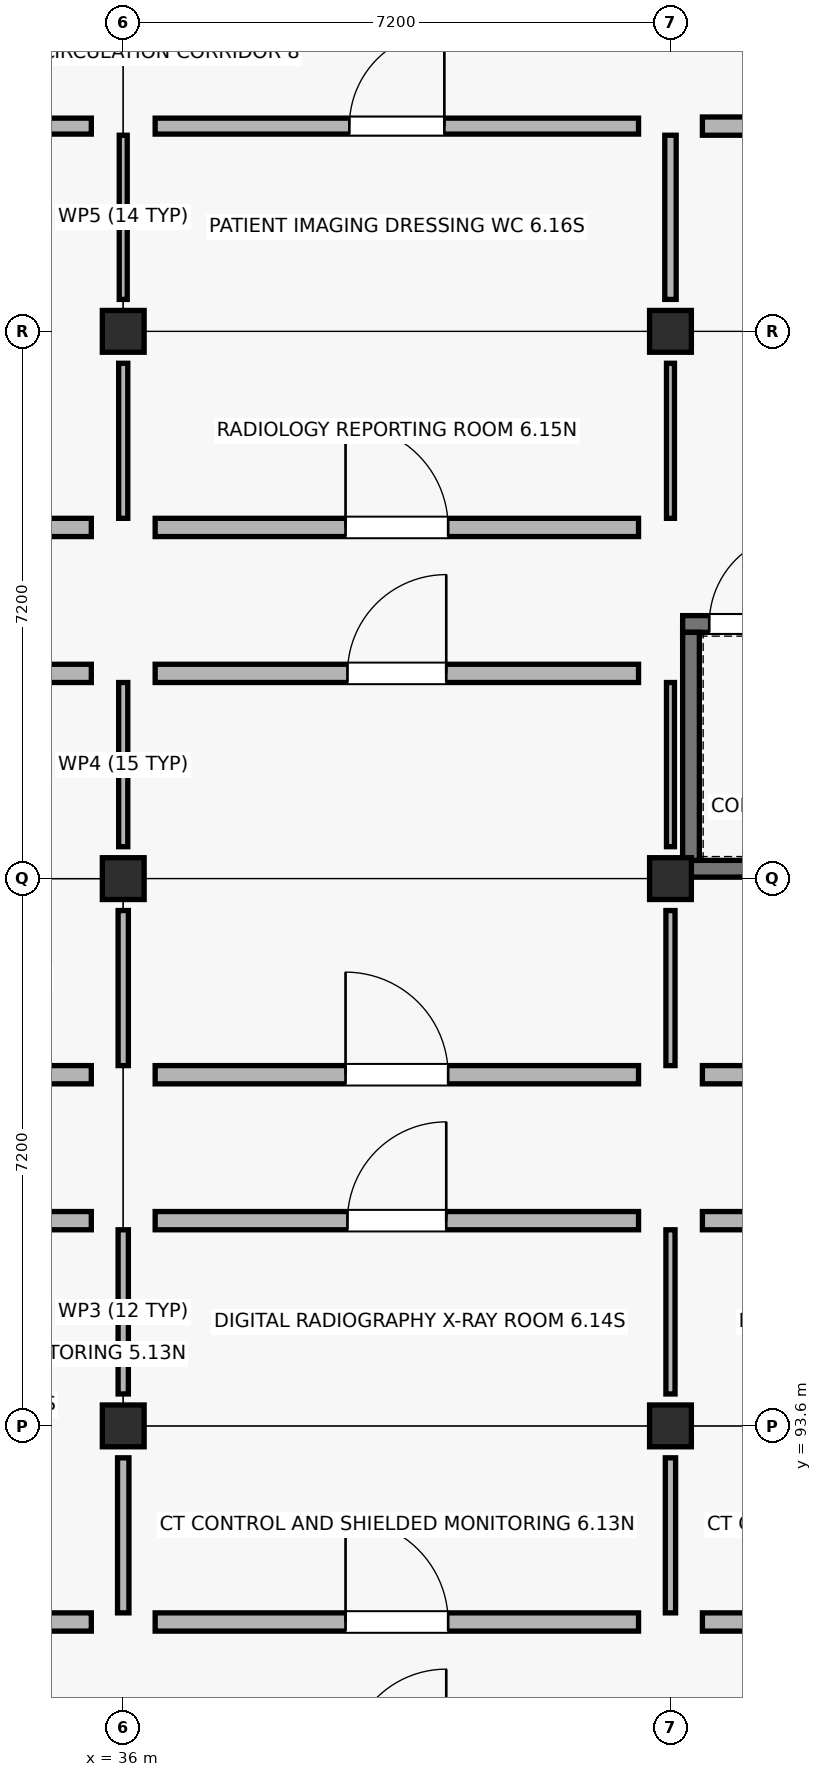
"""IFC4 building model, lengths in metres.
Left out: names, types, materials, properties, quantities, classifications, styles, units other than length and angle.
Written with IfcOpenShell. Run it as: python <this file> out.ifc"""

import sys

from ifc_helpers import new_model, si_unit, direction, frame, frame_2d, origin, origin_2d, place, context, subcontext, project, spatial, rectangle, extrude, element, fill, save


model = new_model("IFC4")
c1 = context("Model", 3, precision=1e-05, world=origin(), true_north=direction((0.0, 1.0)))
c2 = subcontext(c1, "Body", "Model", "MODEL_VIEW")
j1 = project(units=[si_unit("LENGTHUNIT", "METRE"), si_unit("PLANEANGLEUNIT", "RADIAN")], contexts=[c1])
p1 = place(None, origin())
s1 = spatial("IfcSite", under=j1, at=p1, CompositionType="ELEMENT")
p2 = place(p1, origin())
s2 = spatial("IfcBuilding", under=s1, at=p2, CompositionType="ELEMENT")
p3 = place(p2, frame((0.0, 0.0, 4.5)))
s3 = spatial("IfcBuildingStorey", under=s2, at=p3, CompositionType="ELEMENT", Elevation=4.5)
for number, where, z_axis, x_axis in (
    (1, (36.0, 93.6, 0.0), (0.0, 0.0, 1.0), (1.0, 0.0, 0.0)),
    (2, (36.0, 100.8, 0.0), (0.0, 0.0, 1.0), (1.0, 0.0, 0.0)),
    (3, (36.0, 108.0, 0.0), (0.0, 0.0, 1.0), (1.0, 0.0, 0.0)),
    (4, (43.2, 93.6, 0.0), (0.0, 0.0, 1.0), (1.0, 0.0, 0.0)),
    (5, (43.2, 100.8, 0.0), (0.0, 0.0, 1.0), (1.0, 0.0, 0.0)),
    (6, (43.2, 108.0, 0.0), (0.0, 0.0, 1.0), (1.0, 0.0, 0.0)),
):
    element("IfcColumn", number, at=place(p3, frame(where, z_axis=z_axis, x_axis=x_axis)), inside=s3, PredefinedType="COLUMN", context=c2, shape_type="SweptSolid", body=[
        extrude(rectangle(XDim=0.55, YDim=0.55, at=origin_2d()), origin(), (0.0, 0.0, 1.0), 4.5),
    ])
p4 = place(p3, frame((43.36, 100.93, 0.0), z_axis=(0.0, 0.0, 1.0), x_axis=(1.0, 0.0, 0.0)))
e7 = element("IfcWall", 7, at=p4, inside=s3, PredefinedType="SHEAR", context=c2, shape_type="SweptSolid", body=[
    extrude(rectangle(XDim=6.88, YDim=0.22, at=frame_2d((3.44, 0.0))), origin(), (0.0, 0.0, 1.0), 4.22),
])
p5 = place(p3, frame((43.36, 104.15, 0.0), z_axis=(0.0, 0.0, 1.0), x_axis=(1.0, 0.0, 0.0)))
e8 = element("IfcWall", 8, at=p5, inside=s3, PredefinedType="SHEAR", context=c2, shape_type="SweptSolid", body=[
    extrude(rectangle(XDim=6.88, YDim=0.22, at=frame_2d((3.44, 0.0))), origin(), (0.0, 0.0, 1.0), 4.22),
])
p6 = place(p5, frame((0.35, 0.0, 0.0)))
e9 = element("IfcOpeningElement", 9, at=p6, cuts=e8, PredefinedType="OPENING", context=c2, shape_type="SweptSolid", body=[
    extrude(rectangle(XDim=1.2, YDim=2.15, at=frame_2d((0.6, 1.075))), frame((0.0, 0.12, 0.0), z_axis=(0.0, -1.0, 0.0), x_axis=(1.0, 0.0, 0.0)), (0.0, 0.0, 1.0), 0.24),
])
p7 = place(p3, frame((43.47, 101.04, 0.0), z_axis=(0.0, 0.0, 1.0), x_axis=(0.0, 1.0, 0.0)))
e10 = element("IfcWall", 10, at=p7, inside=s3, PredefinedType="SHEAR", context=c2, shape_type="SweptSolid", body=[
    extrude(rectangle(XDim=3.0, YDim=0.22, at=frame_2d((1.5, 0.0))), origin(), (0.0, 0.0, 1.0), 4.22),
])
p8 = place(p3, frame((29.22, 91.02, 0.0), z_axis=(0.0, 0.0, 1.0), x_axis=(1.0, 0.0, 0.0)))
e11 = element("IfcWall", 11, at=p8, inside=s3, PredefinedType="SOLIDWALL", context=c2, shape_type="SweptSolid", body=[
    extrude(rectangle(XDim=6.36, YDim=0.24, at=frame_2d((3.18, 0.0))), origin(), (0.0, 0.0, 1.0), 3.36),
])
p9 = place(p8, frame((2.505, 0.0, 0.0)))
e12 = element("IfcOpeningElement", 12, at=p9, cuts=e11, PredefinedType="OPENING", context=c2, shape_type="SweptSolid", body=[
    extrude(rectangle(XDim=1.35, YDim=2.2, at=frame_2d((0.675, 1.1))), frame((0.0, 0.13, 0.0), z_axis=(0.0, -1.0, 0.0), x_axis=(1.0, 0.0, 0.0)), (0.0, 0.0, 1.0), 0.26),
])
p10 = place(p3, frame((36.0, 91.14, 0.0), z_axis=(0.0, 0.0, 1.0), x_axis=(0.0, 1.0, 0.0)))
e13 = element("IfcWall", 13, at=p10, inside=s3, PredefinedType="PARTITIONING", context=c2, shape_type="SweptSolid", body=[
    extrude(rectangle(XDim=2.04, YDim=0.15, at=frame_2d((1.02, 0.0))), origin(), (0.0, 0.0, 1.0), 3.36),
])
p11 = place(p3, frame((29.22, 96.3, 0.0), z_axis=(0.0, 0.0, 1.0), x_axis=(1.0, 0.0, 0.0)))
e14 = element("IfcWall", 14, at=p11, inside=s3, PredefinedType="SOLIDWALL", context=c2, shape_type="SweptSolid", body=[
    extrude(rectangle(XDim=6.36, YDim=0.24, at=frame_2d((3.18, 0.0))), origin(), (0.0, 0.0, 1.0), 3.36),
])
p12 = place(p11, frame((2.53, 0.0, 0.0)))
e15 = element("IfcOpeningElement", 15, at=p12, cuts=e14, PredefinedType="OPENING", context=c2, shape_type="SweptSolid", body=[
    extrude(rectangle(XDim=1.3, YDim=2.15, at=frame_2d((0.65, 1.075))), frame((0.0, 0.13, 0.0), z_axis=(0.0, -1.0, 0.0), x_axis=(1.0, 0.0, 0.0)), (0.0, 0.0, 1.0), 0.26),
])
p13 = place(p3, frame((36.0, 94.02, 0.0), z_axis=(0.0, 0.0, 1.0), x_axis=(0.0, 1.0, 0.0)))
e16 = element("IfcWall", 16, at=p13, inside=s3, PredefinedType="PARTITIONING", context=c2, shape_type="SweptSolid", body=[
    extrude(rectangle(XDim=2.16, YDim=0.135, at=frame_2d((1.08, 0.0))), origin(), (0.0, 0.0, 1.0), 3.36),
])
p14 = place(p3, frame((29.22, 98.22, 0.0), z_axis=(0.0, 0.0, 1.0), x_axis=(1.0, 0.0, 0.0)))
e17 = element("IfcWall", 17, at=p14, inside=s3, PredefinedType="SOLIDWALL", context=c2, shape_type="SweptSolid", body=[
    extrude(rectangle(XDim=6.36, YDim=0.24, at=frame_2d((3.18, 0.0))), origin(), (0.0, 0.0, 1.0), 3.36),
])
p15 = place(p14, frame((2.505, 0.0, 0.0)))
e18 = element("IfcOpeningElement", 18, at=p15, cuts=e17, PredefinedType="OPENING", context=c2, shape_type="SweptSolid", body=[
    extrude(rectangle(XDim=1.35, YDim=2.2, at=frame_2d((0.675, 1.1))), frame((0.0, 0.13, 0.0), z_axis=(0.0, -1.0, 0.0), x_axis=(1.0, 0.0, 0.0)), (0.0, 0.0, 1.0), 0.26),
])
p16 = place(p3, frame((36.0, 98.34, 0.0), z_axis=(0.0, 0.0, 1.0), x_axis=(0.0, 1.0, 0.0)))
e19 = element("IfcWall", 19, at=p16, inside=s3, PredefinedType="PARTITIONING", context=c2, shape_type="SweptSolid", body=[
    extrude(rectangle(XDim=2.04, YDim=0.135, at=frame_2d((1.02, 0.0))), origin(), (0.0, 0.0, 1.0), 3.36),
])
p17 = place(p3, frame((29.22, 103.5, 0.0), z_axis=(0.0, 0.0, 1.0), x_axis=(1.0, 0.0, 0.0)))
e20 = element("IfcWall", 20, at=p17, inside=s3, PredefinedType="SOLIDWALL", context=c2, shape_type="SweptSolid", body=[
    extrude(rectangle(XDim=6.36, YDim=0.24, at=frame_2d((3.18, 0.0))), origin(), (0.0, 0.0, 1.0), 3.36),
])
p18 = place(p17, frame((2.53, 0.0, 0.0)))
e21 = element("IfcOpeningElement", 21, at=p18, cuts=e20, PredefinedType="OPENING", context=c2, shape_type="SweptSolid", body=[
    extrude(rectangle(XDim=1.3, YDim=2.15, at=frame_2d((0.65, 1.075))), frame((0.0, 0.13, 0.0), z_axis=(0.0, -1.0, 0.0), x_axis=(1.0, 0.0, 0.0)), (0.0, 0.0, 1.0), 0.26),
])
p19 = place(p3, frame((36.0, 101.22, 0.0), z_axis=(0.0, 0.0, 1.0), x_axis=(0.0, 1.0, 0.0)))
e22 = element("IfcWall", 22, at=p19, inside=s3, PredefinedType="PARTITIONING", context=c2, shape_type="SweptSolid", body=[
    extrude(rectangle(XDim=2.16, YDim=0.12, at=frame_2d((1.08, 0.0))), origin(), (0.0, 0.0, 1.0), 3.36),
])
p20 = place(p3, frame((29.22, 105.42, 0.0), z_axis=(0.0, 0.0, 1.0), x_axis=(1.0, 0.0, 0.0)))
e23 = element("IfcWall", 23, at=p20, inside=s3, PredefinedType="SOLIDWALL", context=c2, shape_type="SweptSolid", body=[
    extrude(rectangle(XDim=6.36, YDim=0.24, at=frame_2d((3.18, 0.0))), origin(), (0.0, 0.0, 1.0), 3.36),
])
p21 = place(p20, frame((2.505, 0.0, 0.0)))
e24 = element("IfcOpeningElement", 24, at=p21, cuts=e23, PredefinedType="OPENING", context=c2, shape_type="SweptSolid", body=[
    extrude(rectangle(XDim=1.35, YDim=2.2, at=frame_2d((0.675, 1.1))), frame((0.0, 0.13, 0.0), z_axis=(0.0, -1.0, 0.0), x_axis=(1.0, 0.0, 0.0)), (0.0, 0.0, 1.0), 0.26),
])
p22 = place(p3, frame((36.0, 105.54, 0.0), z_axis=(0.0, 0.0, 1.0), x_axis=(0.0, 1.0, 0.0)))
e25 = element("IfcWall", 25, at=p22, inside=s3, PredefinedType="PARTITIONING", context=c2, shape_type="SweptSolid", body=[
    extrude(rectangle(XDim=2.04, YDim=0.12, at=frame_2d((1.02, 0.0))), origin(), (0.0, 0.0, 1.0), 3.36),
])
p23 = place(p3, frame((29.22, 110.7, 0.0), z_axis=(0.0, 0.0, 1.0), x_axis=(1.0, 0.0, 0.0)))
e26 = element("IfcWall", 26, at=p23, inside=s3, PredefinedType="PLUMBINGWALL", context=c2, shape_type="SweptSolid", body=[
    extrude(rectangle(XDim=6.36, YDim=0.21, at=frame_2d((3.18, 0.0))), origin(), (0.0, 0.0, 1.0), 3.36),
])
p24 = place(p23, frame((2.57, 0.0, 0.0)))
e27 = element("IfcOpeningElement", 27, at=p24, cuts=e26, PredefinedType="OPENING", context=c2, shape_type="SweptSolid", body=[
    extrude(rectangle(XDim=1.22, YDim=2.19, at=frame_2d((0.61, 1.095))), frame((0.0, 0.115, 0.0), z_axis=(0.0, -1.0, 0.0), x_axis=(1.0, 0.0, 0.0)), (0.0, 0.0, 1.0), 0.23),
])
p25 = place(p3, frame((36.0, 108.42, 0.0), z_axis=(0.0, 0.0, 1.0), x_axis=(0.0, 1.0, 0.0)))
e28 = element("IfcWall", 28, at=p25, inside=s3, PredefinedType="PARTITIONING", context=c2, shape_type="SweptSolid", body=[
    extrude(rectangle(XDim=2.16, YDim=0.105, at=frame_2d((1.08, 0.0))), origin(), (0.0, 0.0, 1.0), 3.36),
])
p26 = place(p3, frame((36.42, 91.02, 0.0), z_axis=(0.0, 0.0, 1.0), x_axis=(1.0, 0.0, 0.0)))
e29 = element("IfcWall", 29, at=p26, inside=s3, PredefinedType="SOLIDWALL", context=c2, shape_type="SweptSolid", body=[
    extrude(rectangle(XDim=6.36, YDim=0.24, at=frame_2d((3.18, 0.0))), origin(), (0.0, 0.0, 1.0), 3.36),
])
p27 = place(p26, frame((2.505, 0.0, 0.0)))
e30 = element("IfcOpeningElement", 30, at=p27, cuts=e29, PredefinedType="OPENING", context=c2, shape_type="SweptSolid", body=[
    extrude(rectangle(XDim=1.35, YDim=2.2, at=frame_2d((0.675, 1.1))), frame((0.0, 0.13, 0.0), z_axis=(0.0, -1.0, 0.0), x_axis=(1.0, 0.0, 0.0)), (0.0, 0.0, 1.0), 0.26),
])
p28 = place(p3, frame((43.2, 91.14, 0.0), z_axis=(0.0, 0.0, 1.0), x_axis=(0.0, 1.0, 0.0)))
e31 = element("IfcWall", 31, at=p28, inside=s3, PredefinedType="PARTITIONING", context=c2, shape_type="SweptSolid", body=[
    extrude(rectangle(XDim=2.04, YDim=0.135, at=frame_2d((1.02, 0.0))), origin(), (0.0, 0.0, 1.0), 3.36),
])
p29 = place(p3, frame((36.42, 96.3, 0.0), z_axis=(0.0, 0.0, 1.0), x_axis=(1.0, 0.0, 0.0)))
e32 = element("IfcWall", 32, at=p29, inside=s3, PredefinedType="SOLIDWALL", context=c2, shape_type="SweptSolid", body=[
    extrude(rectangle(XDim=6.36, YDim=0.24, at=frame_2d((3.18, 0.0))), origin(), (0.0, 0.0, 1.0), 3.36),
])
p30 = place(p29, frame((2.53, 0.0, 0.0)))
e33 = element("IfcOpeningElement", 33, at=p30, cuts=e32, PredefinedType="OPENING", context=c2, shape_type="SweptSolid", body=[
    extrude(rectangle(XDim=1.3, YDim=2.15, at=frame_2d((0.65, 1.075))), frame((0.0, 0.13, 0.0), z_axis=(0.0, -1.0, 0.0), x_axis=(1.0, 0.0, 0.0)), (0.0, 0.0, 1.0), 0.26),
])
p31 = place(p3, frame((43.2, 94.02, 0.0), z_axis=(0.0, 0.0, 1.0), x_axis=(0.0, 1.0, 0.0)))
e34 = element("IfcWall", 34, at=p31, inside=s3, PredefinedType="PARTITIONING", context=c2, shape_type="SweptSolid", body=[
    extrude(rectangle(XDim=2.16, YDim=0.12, at=frame_2d((1.08, 0.0))), origin(), (0.0, 0.0, 1.0), 3.36),
])
p32 = place(p3, frame((36.42, 98.22, 0.0), z_axis=(0.0, 0.0, 1.0), x_axis=(1.0, 0.0, 0.0)))
e35 = element("IfcWall", 35, at=p32, inside=s3, PredefinedType="SOLIDWALL", context=c2, shape_type="SweptSolid", body=[
    extrude(rectangle(XDim=6.36, YDim=0.24, at=frame_2d((3.18, 0.0))), origin(), (0.0, 0.0, 1.0), 3.36),
])
p33 = place(p32, frame((2.505, 0.0, 0.0)))
e36 = element("IfcOpeningElement", 36, at=p33, cuts=e35, PredefinedType="OPENING", context=c2, shape_type="SweptSolid", body=[
    extrude(rectangle(XDim=1.35, YDim=2.2, at=frame_2d((0.675, 1.1))), frame((0.0, 0.13, 0.0), z_axis=(0.0, -1.0, 0.0), x_axis=(1.0, 0.0, 0.0)), (0.0, 0.0, 1.0), 0.26),
])
p34 = place(p3, frame((43.2, 98.34, 0.0), z_axis=(0.0, 0.0, 1.0), x_axis=(0.0, 1.0, 0.0)))
e37 = element("IfcWall", 37, at=p34, inside=s3, PredefinedType="PARTITIONING", context=c2, shape_type="SweptSolid", body=[
    extrude(rectangle(XDim=2.04, YDim=0.12, at=frame_2d((1.02, 0.0))), origin(), (0.0, 0.0, 1.0), 3.36),
])
p35 = place(p3, frame((36.42, 103.5, 0.0), z_axis=(0.0, 0.0, 1.0), x_axis=(1.0, 0.0, 0.0)))
e38 = element("IfcWall", 38, at=p35, inside=s3, PredefinedType="SOLIDWALL", context=c2, shape_type="SweptSolid", body=[
    extrude(rectangle(XDim=6.36, YDim=0.24, at=frame_2d((3.18, 0.0))), origin(), (0.0, 0.0, 1.0), 3.36),
])
p36 = place(p35, frame((2.53, 0.0, 0.0)))
e39 = element("IfcOpeningElement", 39, at=p36, cuts=e38, PredefinedType="OPENING", context=c2, shape_type="SweptSolid", body=[
    extrude(rectangle(XDim=1.3, YDim=2.15, at=frame_2d((0.65, 1.075))), frame((0.0, 0.13, 0.0), z_axis=(0.0, -1.0, 0.0), x_axis=(1.0, 0.0, 0.0)), (0.0, 0.0, 1.0), 0.26),
])
p37 = place(p3, frame((43.2, 101.22, 0.0), z_axis=(0.0, 0.0, 1.0), x_axis=(0.0, 1.0, 0.0)))
e40 = element("IfcWall", 40, at=p37, inside=s3, PredefinedType="PARTITIONING", context=c2, shape_type="SweptSolid", body=[
    extrude(rectangle(XDim=2.16, YDim=0.105, at=frame_2d((1.08, 0.0))), origin(), (0.0, 0.0, 1.0), 3.36),
])
p38 = place(p3, frame((36.42, 105.42, 0.0), z_axis=(0.0, 0.0, 1.0), x_axis=(1.0, 0.0, 0.0)))
e41 = element("IfcWall", 41, at=p38, inside=s3, PredefinedType="SOLIDWALL", context=c2, shape_type="SweptSolid", body=[
    extrude(rectangle(XDim=6.36, YDim=0.24, at=frame_2d((3.18, 0.0))), origin(), (0.0, 0.0, 1.0), 3.36),
])
p39 = place(p38, frame((2.505, 0.0, 0.0)))
e42 = element("IfcOpeningElement", 42, at=p39, cuts=e41, PredefinedType="OPENING", context=c2, shape_type="SweptSolid", body=[
    extrude(rectangle(XDim=1.35, YDim=2.2, at=frame_2d((0.675, 1.1))), frame((0.0, 0.13, 0.0), z_axis=(0.0, -1.0, 0.0), x_axis=(1.0, 0.0, 0.0)), (0.0, 0.0, 1.0), 0.26),
])
p40 = place(p3, frame((43.2, 105.54, 0.0), z_axis=(0.0, 0.0, 1.0), x_axis=(0.0, 1.0, 0.0)))
e43 = element("IfcWall", 43, at=p40, inside=s3, PredefinedType="PARTITIONING", context=c2, shape_type="SweptSolid", body=[
    extrude(rectangle(XDim=2.04, YDim=0.105, at=frame_2d((1.02, 0.0))), origin(), (0.0, 0.0, 1.0), 3.36),
])
p41 = place(p3, frame((36.42, 110.7, 0.0), z_axis=(0.0, 0.0, 1.0), x_axis=(1.0, 0.0, 0.0)))
e44 = element("IfcWall", 44, at=p41, inside=s3, PredefinedType="PLUMBINGWALL", context=c2, shape_type="SweptSolid", body=[
    extrude(rectangle(XDim=6.36, YDim=0.21, at=frame_2d((3.18, 0.0))), origin(), (0.0, 0.0, 1.0), 3.36),
])
p42 = place(p41, frame((2.555, 0.0, 0.0)))
e45 = element("IfcOpeningElement", 45, at=p42, cuts=e44, PredefinedType="OPENING", context=c2, shape_type="SweptSolid", body=[
    extrude(rectangle(XDim=1.25, YDim=2.15, at=frame_2d((0.625, 1.075))), frame((0.0, 0.115, 0.0), z_axis=(0.0, -1.0, 0.0), x_axis=(1.0, 0.0, 0.0)), (0.0, 0.0, 1.0), 0.23),
])
p43 = place(p3, frame((43.2, 108.42, 0.0), z_axis=(0.0, 0.0, 1.0), x_axis=(0.0, 1.0, 0.0)))
e46 = element("IfcWall", 46, at=p43, inside=s3, PredefinedType="PARTITIONING", context=c2, shape_type="SweptSolid", body=[
    extrude(rectangle(XDim=2.16, YDim=0.15, at=frame_2d((1.08, 0.0))), origin(), (0.0, 0.0, 1.0), 3.36),
])
p44 = place(p3, frame((43.62, 91.02, 0.0), z_axis=(0.0, 0.0, 1.0), x_axis=(1.0, 0.0, 0.0)))
e47 = element("IfcWall", 47, at=p44, inside=s3, PredefinedType="SOLIDWALL", context=c2, shape_type="SweptSolid", body=[
    extrude(rectangle(XDim=6.36, YDim=0.24, at=frame_2d((3.18, 0.0))), origin(), (0.0, 0.0, 1.0), 3.36),
])
p45 = place(p44, frame((2.505, 0.0, 0.0)))
e48 = element("IfcOpeningElement", 48, at=p45, cuts=e47, PredefinedType="OPENING", context=c2, shape_type="SweptSolid", body=[
    extrude(rectangle(XDim=1.35, YDim=2.2, at=frame_2d((0.675, 1.1))), frame((0.0, 0.13, 0.0), z_axis=(0.0, -1.0, 0.0), x_axis=(1.0, 0.0, 0.0)), (0.0, 0.0, 1.0), 0.26),
])
p46 = place(p3, frame((43.62, 96.3, 0.0), z_axis=(0.0, 0.0, 1.0), x_axis=(1.0, 0.0, 0.0)))
e49 = element("IfcWall", 49, at=p46, inside=s3, PredefinedType="SOLIDWALL", context=c2, shape_type="SweptSolid", body=[
    extrude(rectangle(XDim=6.36, YDim=0.24, at=frame_2d((3.18, 0.0))), origin(), (0.0, 0.0, 1.0), 3.36),
])
p47 = place(p46, frame((2.53, 0.0, 0.0)))
e50 = element("IfcOpeningElement", 50, at=p47, cuts=e49, PredefinedType="OPENING", context=c2, shape_type="SweptSolid", body=[
    extrude(rectangle(XDim=1.3, YDim=2.15, at=frame_2d((0.65, 1.075))), frame((0.0, 0.13, 0.0), z_axis=(0.0, -1.0, 0.0), x_axis=(1.0, 0.0, 0.0)), (0.0, 0.0, 1.0), 0.26),
])
p48 = place(p3, frame((43.62, 98.22, 0.0), z_axis=(0.0, 0.0, 1.0), x_axis=(1.0, 0.0, 0.0)))
e51 = element("IfcWall", 51, at=p48, inside=s3, PredefinedType="SOLIDWALL", context=c2, shape_type="SweptSolid", body=[
    extrude(rectangle(XDim=6.36, YDim=0.24, at=frame_2d((3.18, 0.0))), origin(), (0.0, 0.0, 1.0), 3.36),
])
p49 = place(p48, frame((2.505, 0.0, 0.0)))
e52 = element("IfcOpeningElement", 52, at=p49, cuts=e51, PredefinedType="OPENING", context=c2, shape_type="SweptSolid", body=[
    extrude(rectangle(XDim=1.35, YDim=2.2, at=frame_2d((0.675, 1.1))), frame((0.0, 0.13, 0.0), z_axis=(0.0, -1.0, 0.0), x_axis=(1.0, 0.0, 0.0)), (0.0, 0.0, 1.0), 0.26),
])
p50 = place(p3, frame((43.62, 110.7, 0.0), z_axis=(0.0, 0.0, 1.0), x_axis=(1.0, 0.0, 0.0)))
e53 = element("IfcWall", 53, at=p50, inside=s3, PredefinedType="SOLIDWALL", context=c2, shape_type="SweptSolid", body=[
    extrude(rectangle(XDim=6.36, YDim=0.24, at=frame_2d((3.18, 0.0))), origin(), (0.0, 0.0, 1.0), 3.36),
])
p51 = place(p50, frame((2.53, 0.0, 0.0)))
e54 = element("IfcOpeningElement", 54, at=p51, cuts=e53, PredefinedType="OPENING", context=c2, shape_type="SweptSolid", body=[
    extrude(rectangle(XDim=1.3, YDim=2.15, at=frame_2d((0.65, 1.075))), frame((0.0, 0.13, 0.0), z_axis=(0.0, -1.0, 0.0), x_axis=(1.0, 0.0, 0.0)), (0.0, 0.0, 1.0), 0.26),
])
p52 = place(p6, origin())
e55 = element("IfcDoor", 55, at=p52, inside=s3, OperationType="SINGLE_SWING_RIGHT", PredefinedType="DOOR", context=c2, shape_type="SweptSolid", body=[
    extrude(rectangle(XDim=1.2, YDim=2.15, at=frame_2d((0.6, 1.075))), frame((0.0, 0.025, 0.0), z_axis=(0.0, -1.0, 0.0), x_axis=(1.0, 0.0, 0.0)), (0.0, 0.0, 1.0), 0.05),
])
fill(e9, e55)
p53 = place(p27, origin())
e56 = element("IfcDoor", 56, at=p53, inside=s3, OperationType="SINGLE_SWING_LEFT", PredefinedType="DOOR", context=c2, shape_type="SweptSolid", body=[
    extrude(rectangle(XDim=1.35, YDim=2.2, at=frame_2d((0.675, 1.1))), frame((0.0, 0.025, 0.0), z_axis=(0.0, -1.0, 0.0), x_axis=(1.0, 0.0, 0.0)), (0.0, 0.0, 1.0), 0.05),
])
fill(e30, e56)
p54 = place(p30, origin())
e57 = element("IfcDoor", 57, at=p54, inside=s3, OperationType="SINGLE_SWING_RIGHT", PredefinedType="DOOR", context=c2, shape_type="SweptSolid", body=[
    extrude(rectangle(XDim=1.3, YDim=2.15, at=frame_2d((0.65, 1.075))), frame((0.0, 0.025, 0.0), z_axis=(0.0, -1.0, 0.0), x_axis=(1.0, 0.0, 0.0)), (0.0, 0.0, 1.0), 0.05),
])
fill(e33, e57)
p55 = place(p33, origin())
e58 = element("IfcDoor", 58, at=p55, inside=s3, OperationType="SINGLE_SWING_LEFT", PredefinedType="DOOR", context=c2, shape_type="SweptSolid", body=[
    extrude(rectangle(XDim=1.35, YDim=2.2, at=frame_2d((0.675, 1.1))), frame((0.0, 0.025, 0.0), z_axis=(0.0, -1.0, 0.0), x_axis=(1.0, 0.0, 0.0)), (0.0, 0.0, 1.0), 0.05),
])
fill(e36, e58)
p56 = place(p36, origin())
e59 = element("IfcDoor", 59, at=p56, inside=s3, OperationType="SINGLE_SWING_RIGHT", PredefinedType="DOOR", context=c2, shape_type="SweptSolid", body=[
    extrude(rectangle(XDim=1.3, YDim=2.15, at=frame_2d((0.65, 1.075))), frame((0.0, 0.025, 0.0), z_axis=(0.0, -1.0, 0.0), x_axis=(1.0, 0.0, 0.0)), (0.0, 0.0, 1.0), 0.05),
])
fill(e39, e59)
p57 = place(p39, origin())
e60 = element("IfcDoor", 60, at=p57, inside=s3, OperationType="SINGLE_SWING_LEFT", PredefinedType="DOOR", context=c2, shape_type="SweptSolid", body=[
    extrude(rectangle(XDim=1.35, YDim=2.2, at=frame_2d((0.675, 1.1))), frame((0.0, 0.025, 0.0), z_axis=(0.0, -1.0, 0.0), x_axis=(1.0, 0.0, 0.0)), (0.0, 0.0, 1.0), 0.05),
])
fill(e42, e60)
p58 = place(p42, origin())
e61 = element("IfcDoor", 61, at=p58, inside=s3, OperationType="SINGLE_SWING_RIGHT", PredefinedType="DOOR", context=c2, shape_type="SweptSolid", body=[
    extrude(rectangle(XDim=1.25, YDim=2.15, at=frame_2d((0.625, 1.075))), frame((0.0, 0.025, 0.0), z_axis=(0.0, -1.0, 0.0), x_axis=(1.0, 0.0, 0.0)), (0.0, 0.0, 1.0), 0.05),
])
fill(e45, e61)
save(model, sys.argv[1])
